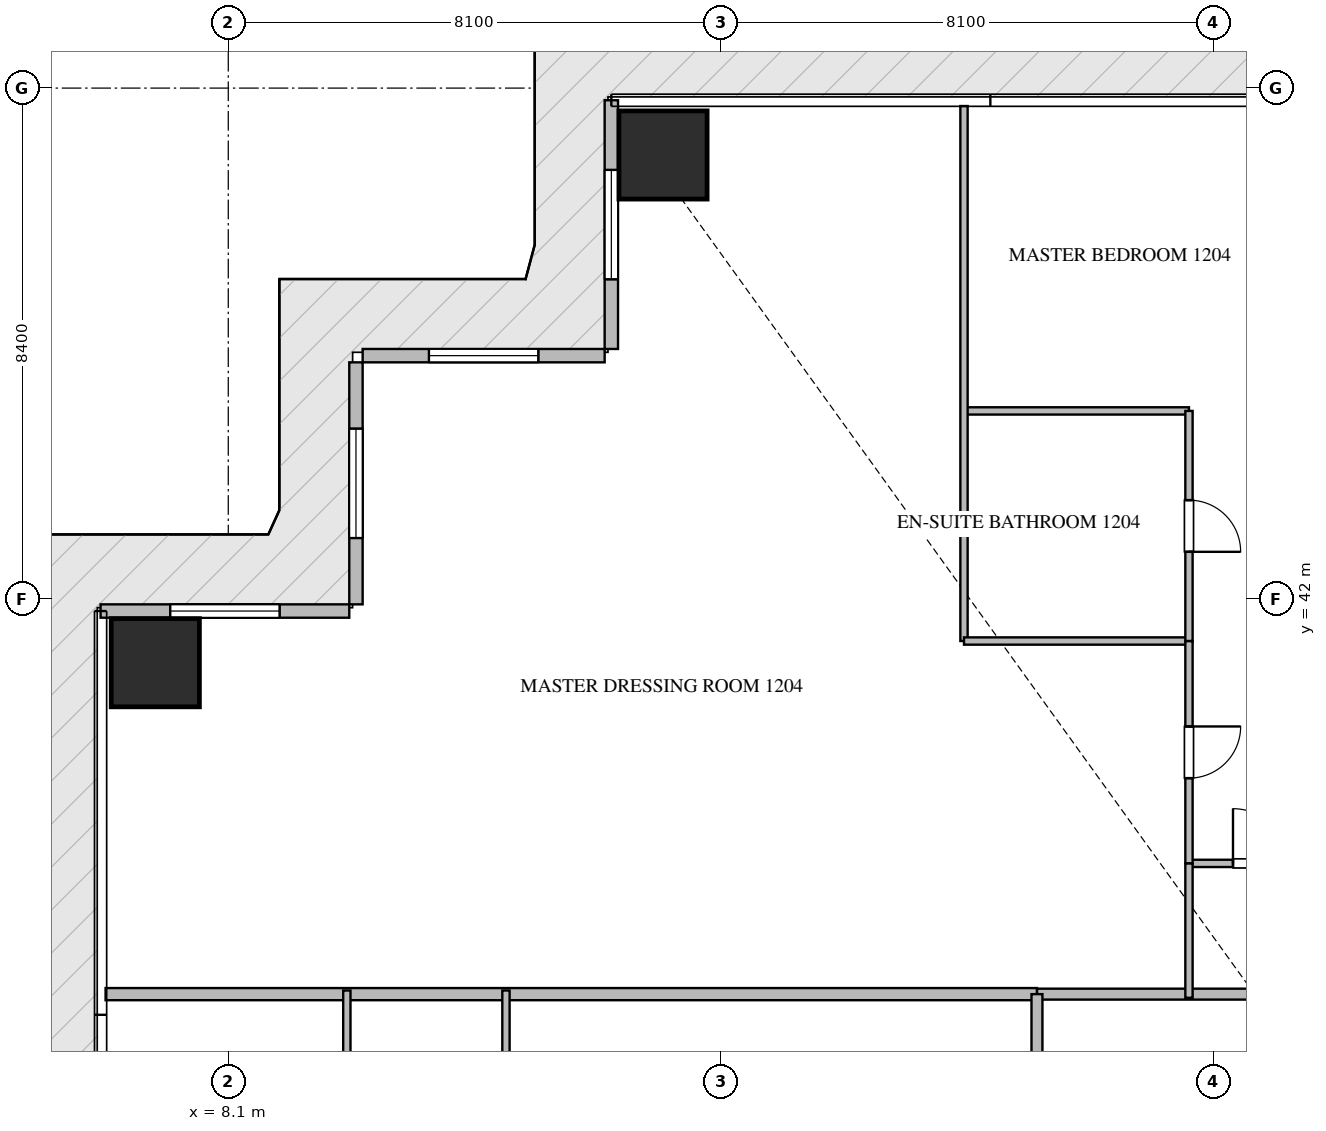
"""IFC4 building model, lengths in metres.
Left out: names, types, materials, properties, quantities, classifications, styles, units other than length and angle.
Written with IfcOpenShell. Run it as: python <this file> out.ifc"""

import sys

from ifc_helpers import new_model, si_unit, direction, frame, frame_2d, origin, origin_2d, place, context, subcontext, project, spatial, rectangle, extrude, source, transform, mapped, element, fill, save


model = new_model("IFC4")
c1 = context("Model", 3, precision=1e-05, world=origin(), true_north=direction((0.0, 1.0)))
c2 = subcontext(c1, "Body", "Model", "MODEL_VIEW")
j1 = project(units=[si_unit("LENGTHUNIT", "METRE"), si_unit("PLANEANGLEUNIT", "RADIAN")], contexts=[c1])
p1 = place(None, origin())
s1 = spatial("IfcSite", under=j1, at=p1, CompositionType="ELEMENT")
p2 = place(p1, origin())
s2 = spatial("IfcBuilding", under=s1, at=p2, CompositionType="ELEMENT")
p3 = place(p2, frame((0.0, 0.0, 52.95)))
s3 = spatial("IfcBuildingStorey", under=s2, at=p3, CompositionType="ELEMENT", Elevation=52.95)
m1 = source(origin(), c2, "Body", "SweptSolid", [
    extrude(rectangle(XDim=1.45, YDim=1.45, at=origin_2d()), origin(), (0.0, 0.0, 1.0), 3.75),
])
for number, where, z_axis, x_axis in (
    (1, (15.25, 49.3, -0.26), (0.0, 0.0, 1.0), (1.0, 0.0, 0.0)),
    (2, (6.9, 40.95, -0.26), (0.0, 0.0, 1.0), (1.0, 0.0, 0.0)),
):
    element("IfcColumn", number, at=place(p3, frame(where, z_axis=z_axis, x_axis=x_axis)), inside=s3, PredefinedType="COLUMN", context=c2, shape_type="MappedRepresentation", body=[
        mapped(m1, transform((0.0, 0.0, 0.0), scale=1.0)),
    ])
p4 = place(p3, frame((14.4, 50.2, 0.0), z_axis=(0.0, 0.0, 1.0), x_axis=(0.0, -1.0, 0.0)))
e3 = element("IfcWall", 3, at=p4, inside=s3, PredefinedType="ELEMENTEDWALL", context=c2, shape_type="SweptSolid", body=[
    extrude(rectangle(XDim=4.09, YDim=0.22, at=frame_2d((2.045, 0.0))), origin(), (0.0, 0.0, 1.0), 3.475),
])
p5 = place(p4, frame((1.145, 0.0, 0.65)))
e4 = element("IfcOpeningElement", 4, at=p5, cuts=e3, PredefinedType="OPENING", context=c2, shape_type="SweptSolid", body=[
    extrude(rectangle(XDim=1.8, YDim=2.1, at=frame_2d((0.9, 1.05))), frame((0.0, 0.12, 0.0), z_axis=(0.0, -1.0, 0.0), x_axis=(1.0, 0.0, 0.0)), (0.0, 0.0, 1.0), 0.24),
])
p6 = place(p3, frame((14.29, 46.0, 0.0), z_axis=(0.0, 0.0, 1.0), x_axis=(-1.0, 0.0, 0.0)))
e5 = element("IfcWall", 5, at=p6, inside=s3, PredefinedType="ELEMENTEDWALL", context=c2, shape_type="SweptSolid", body=[
    extrude(rectangle(XDim=3.98, YDim=0.22, at=frame_2d((1.99, 0.0))), origin(), (0.0, 0.0, 1.0), 3.475),
])
p7 = place(p6, frame((1.09, 0.0, 0.65)))
e6 = element("IfcOpeningElement", 6, at=p7, cuts=e5, PredefinedType="OPENING", context=c2, shape_type="SweptSolid", body=[
    extrude(rectangle(XDim=1.8, YDim=2.1, at=frame_2d((0.9, 1.05))), frame((0.0, 0.12, 0.0), z_axis=(0.0, -1.0, 0.0), x_axis=(1.0, 0.0, 0.0)), (0.0, 0.0, 1.0), 0.24),
])
p8 = place(p3, frame((10.2, 45.89, 0.0), z_axis=(0.0, 0.0, 1.0), x_axis=(0.0, -1.0, 0.0)))
e7 = element("IfcWall", 7, at=p8, inside=s3, PredefinedType="ELEMENTEDWALL", context=c2, shape_type="SweptSolid", body=[
    extrude(rectangle(XDim=3.98, YDim=0.22, at=frame_2d((1.99, 0.0))), origin(), (0.0, 0.0, 1.0), 3.475),
])
p9 = place(p8, frame((1.09, 0.0, 0.65)))
e8 = element("IfcOpeningElement", 8, at=p9, cuts=e7, PredefinedType="OPENING", context=c2, shape_type="SweptSolid", body=[
    extrude(rectangle(XDim=1.8, YDim=2.1, at=frame_2d((0.9, 1.05))), frame((0.0, 0.12, 0.0), z_axis=(0.0, -1.0, 0.0), x_axis=(1.0, 0.0, 0.0)), (0.0, 0.0, 1.0), 0.24),
])
p10 = place(p3, frame((10.09, 41.8, 0.0), z_axis=(0.0, 0.0, 1.0), x_axis=(-1.0, 0.0, 0.0)))
e9 = element("IfcWall", 9, at=p10, inside=s3, PredefinedType="ELEMENTEDWALL", context=c2, shape_type="SweptSolid", body=[
    extrude(rectangle(XDim=4.09, YDim=0.22, at=frame_2d((2.045, 0.0))), origin(), (0.0, 0.0, 1.0), 3.475),
])
p11 = place(p10, frame((1.145, 0.0, 0.65)))
e10 = element("IfcOpeningElement", 10, at=p11, cuts=e9, PredefinedType="OPENING", context=c2, shape_type="SweptSolid", body=[
    extrude(rectangle(XDim=1.8, YDim=2.1, at=frame_2d((0.9, 1.05))), frame((0.0, 0.12, 0.0), z_axis=(0.0, -1.0, 0.0), x_axis=(1.0, 0.0, 0.0)), (0.0, 0.0, 1.0), 0.24),
])
p12 = place(p3, frame((6.082, 35.5, 0.0), z_axis=(0.0, 0.0, 1.0), x_axis=(1.0, 0.0, 0.0)))
e11 = element("IfcWall", 11, at=p12, inside=s3, PredefinedType="PARTITIONING", context=c2, shape_type="SweptSolid", body=[
    extrude(rectangle(XDim=15.318, YDim=0.2, at=frame_2d((7.659, 0.0))), origin(), (0.0, 0.0, 1.0), 3.49),
])
p13 = place(p3, frame((21.402, 35.5, 0.0), z_axis=(0.0, 0.0, 1.0), x_axis=(1.0, 0.0, 0.0)))
e12 = element("IfcWall", 12, at=p13, inside=s3, PredefinedType="PARTITIONING", context=c2, shape_type="SweptSolid", body=[
    extrude(rectangle(XDim=21.996, YDim=0.18, at=frame_2d((10.998, 0.0))), origin(), (0.0, 0.0, 1.0), 3.49),
])
p14 = place(p13, frame((15.222, 0.0, 0.0)))
e13 = element("IfcOpeningElement", 13, at=p14, cuts=e12, PredefinedType="OPENING", context=c2, shape_type="SweptSolid", body=[
    extrude(rectangle(XDim=1.0, YDim=2.15, at=frame_2d((0.5, 1.075))), frame((0.0, 0.1, 0.0), z_axis=(0.0, -1.0, 0.0), x_axis=(1.0, 0.0, 0.0)), (0.0, 0.0, 1.0), 0.2),
])
p15 = place(p3, frame((21.4, 14.9, 0.0), z_axis=(0.0, 0.0, 1.0), x_axis=(0.0, 1.0, 0.0)))
e14 = element("IfcWall", 14, at=p15, inside=s3, PredefinedType="PARTITIONING", context=c2, shape_type="SweptSolid", body=[
    extrude(rectangle(XDim=20.6, YDim=0.18, at=frame_2d((10.3, 0.0))), origin(), (0.0, 0.0, 1.0), 3.49),
])
p16 = place(p15, frame((1.96, 0.0, 0.0)))
e15 = element("IfcOpeningElement", 15, at=p16, cuts=e14, PredefinedType="OPENING", context=c2, shape_type="SweptSolid", body=[
    extrude(rectangle(XDim=1.0, YDim=2.15, at=frame_2d((0.5, 1.075))), frame((0.0, 0.1, 0.0), z_axis=(0.0, -1.0, 0.0), x_axis=(1.0, 0.0, 0.0)), (0.0, 0.0, 1.0), 0.2),
])
p17 = place(p3, frame((23.9, 37.65, 0.0), z_axis=(0.0, 0.0, 1.0), x_axis=(1.0, 0.0, 0.0)))
e16 = element("IfcWall", 16, at=p17, inside=s3, PredefinedType="PARTITIONING", context=c2, shape_type="SweptSolid", body=[
    extrude(rectangle(XDim=2.348, YDim=0.12, at=frame_2d((1.174, 0.0))), origin(), (0.0, 0.0, 1.0), 3.49),
])
p18 = place(p17, frame((0.724, 0.0, 0.0)))
e17 = element("IfcOpeningElement", 17, at=p18, cuts=e16, PredefinedType="OPENING", context=c2, shape_type="SweptSolid", body=[
    extrude(rectangle(XDim=0.9, YDim=2.1, at=frame_2d((0.45, 1.05))), frame((0.0, 0.07, 0.0), z_axis=(0.0, -1.0, 0.0), x_axis=(1.0, 0.0, 0.0)), (0.0, 0.0, 1.0), 0.14),
])
p19 = place(p3, frame((20.2, 45.091, 0.0), z_axis=(0.0, 0.0, 1.0), x_axis=(1.0, 0.0, 0.0)))
e18 = element("IfcWall", 18, at=p19, inside=s3, PredefinedType="PARTITIONING", context=c2, shape_type="SweptSolid", body=[
    extrude(rectangle(XDim=3.7, YDim=0.12, at=frame_2d((1.85, 0.0))), origin(), (0.0, 0.0, 1.0), 3.49),
])
p20 = place(p3, frame((20.2, 50.105, 0.0), z_axis=(0.0, 0.0, 1.0), x_axis=(0.0, -1.0, 0.0)))
e19 = element("IfcWall", 19, at=p20, inside=s3, PredefinedType="PARTITIONING", context=c2, shape_type="SweptSolid", body=[
    extrude(rectangle(XDim=8.798, YDim=0.12, at=frame_2d((4.399, 0.0))), origin(), (0.0, 0.0, 1.0), 3.49),
])
p21 = place(p3, frame((20.2, 41.307, 0.0), z_axis=(0.0, 0.0, 1.0), x_axis=(1.0, 0.0, 0.0)))
e20 = element("IfcWall", 20, at=p21, inside=s3, PredefinedType="PARTITIONING", context=c2, shape_type="SweptSolid", body=[
    extrude(rectangle(XDim=3.7, YDim=0.12, at=frame_2d((1.85, 0.0))), origin(), (0.0, 0.0, 1.0), 3.49),
])
p22 = place(p3, frame((23.9, 45.091, 0.0), z_axis=(0.0, 0.0, 1.0), x_axis=(0.0, -1.0, 0.0)))
e21 = element("IfcWall", 21, at=p22, inside=s3, PredefinedType="PARTITIONING", context=c2, shape_type="SweptSolid", body=[
    extrude(rectangle(XDim=3.784, YDim=0.12, at=frame_2d((1.892, 0.0))), origin(), (0.0, 0.0, 1.0), 3.49),
])
p23 = place(p22, frame((1.467, 0.0, 0.0)))
e22 = element("IfcOpeningElement", 22, at=p23, cuts=e21, PredefinedType="OPENING", context=c2, shape_type="SweptSolid", body=[
    extrude(rectangle(XDim=0.85, YDim=2.1, at=frame_2d((0.425, 1.05))), frame((0.0, 0.07, 0.0), z_axis=(0.0, -1.0, 0.0), x_axis=(1.0, 0.0, 0.0)), (0.0, 0.0, 1.0), 0.14),
])
p24 = place(p3, frame((23.9, 41.305, 0.0), z_axis=(0.0, 0.0, 1.0), x_axis=(0.0, -1.0, 0.0)))
e23 = element("IfcWall", 23, at=p24, inside=s3, PredefinedType="PARTITIONING", context=c2, shape_type="SweptSolid", body=[
    extrude(rectangle(XDim=3.655, YDim=0.12, at=frame_2d((1.828, 0.0))), origin(), (0.0, 0.0, 1.0), 3.49),
])
p25 = place(p24, frame((1.403, 0.0, 0.0)))
e24 = element("IfcOpeningElement", 24, at=p25, cuts=e23, PredefinedType="OPENING", context=c2, shape_type="SweptSolid", body=[
    extrude(rectangle(XDim=0.85, YDim=2.1, at=frame_2d((0.425, 1.05))), frame((0.0, 0.07, 0.0), z_axis=(0.0, -1.0, 0.0), x_axis=(1.0, 0.0, 0.0)), (0.0, 0.0, 1.0), 0.14),
])
p26 = place(p3, frame((23.9, 37.648, 0.0), z_axis=(0.0, 0.0, 1.0), x_axis=(0.0, -1.0, 0.0)))
e25 = element("IfcWall", 25, at=p26, inside=s3, PredefinedType="PARTITIONING", context=c2, shape_type="SweptSolid", body=[
    extrude(rectangle(XDim=2.208, YDim=0.12, at=frame_2d((1.104, 0.0))), origin(), (0.0, 0.0, 1.0), 3.49),
])
for number, where, z_axis, x_axis in (
    (26, (10.05, 30.15, 0.0), (0.0, 0.0, 1.0), (0.0, 1.0, 0.0)),
    (27, (12.667, 30.15, 0.0), (0.0, 0.0, 1.0), (0.0, 1.0, 0.0)),
):
    element("IfcWall", number, at=place(p3, frame(where, z_axis=z_axis, x_axis=x_axis)), inside=s3, PredefinedType="PARTITIONING", context=c2, shape_type="SweptSolid", body=[
        extrude(rectangle(XDim=5.41, YDim=0.12, at=frame_2d((2.705, 0.0))), origin(), (0.0, 0.0, 1.0), 3.49),
    ])
m2 = source(origin(), c2, "Body", "SweptSolid", [
    extrude(rectangle(XDim=1.8, YDim=2.1, at=frame_2d((0.9, 1.05))), frame((0.0, 0.03, 0.0), z_axis=(0.0, -1.0, 0.0), x_axis=(1.0, 0.0, 0.0)), (0.0, 0.0, 1.0), 0.06),
])
p27 = place(p5, origin())
e28 = element("IfcWindow", 28, at=p27, inside=s3, PartitioningType="SINGLE_PANEL", PredefinedType="WINDOW", context=c2, shape_type="MappedRepresentation", body=[
    mapped(m2, transform((0.0, 0.0, 0.0), scale=1.0)),
])
fill(e4, e28)
p28 = place(p7, origin())
e29 = element("IfcWindow", 29, at=p28, inside=s3, PartitioningType="SINGLE_PANEL", PredefinedType="WINDOW", context=c2, shape_type="MappedRepresentation", body=[
    mapped(m2, transform((0.0, 0.0, 0.0), scale=1.0)),
])
fill(e6, e29)
p29 = place(p9, origin())
e30 = element("IfcWindow", 30, at=p29, inside=s3, PartitioningType="SINGLE_PANEL", PredefinedType="WINDOW", context=c2, shape_type="MappedRepresentation", body=[
    mapped(m2, transform((0.0, 0.0, 0.0), scale=1.0)),
])
fill(e8, e30)
p30 = place(p11, origin())
e31 = element("IfcWindow", 31, at=p30, inside=s3, PartitioningType="SINGLE_PANEL", PredefinedType="WINDOW", context=c2, shape_type="MappedRepresentation", body=[
    mapped(m2, transform((0.0, 0.0, 0.0), scale=1.0)),
])
fill(e10, e31)
m3 = source(origin(), c2, "Body", "SweptSolid", [
    extrude(rectangle(XDim=0.9, YDim=2.1, at=frame_2d((0.45, 1.05))), frame((0.0, 0.025, 0.0), z_axis=(0.0, -1.0, 0.0), x_axis=(1.0, 0.0, 0.0)), (0.0, 0.0, 1.0), 0.05),
])
p31 = place(p18, origin())
e32 = element("IfcDoor", 32, at=p31, inside=s3, OperationType="SINGLE_SWING_LEFT", PredefinedType="DOOR", context=c2, shape_type="MappedRepresentation", body=[
    mapped(m3, transform((0.0, 0.0, 0.0), scale=1.0)),
])
fill(e17, e32)
m4 = source(origin(), c2, "Body", "SweptSolid", [
    extrude(rectangle(XDim=0.85, YDim=2.1, at=frame_2d((0.425, 1.05))), frame((0.0, 0.025, 0.0), z_axis=(0.0, -1.0, 0.0), x_axis=(1.0, 0.0, 0.0)), (0.0, 0.0, 1.0), 0.05),
])
p32 = place(p23, origin())
e33 = element("IfcDoor", 33, at=p32, inside=s3, OperationType="SINGLE_SWING_RIGHT", PredefinedType="DOOR", context=c2, shape_type="MappedRepresentation", body=[
    mapped(m4, transform((0.0, 0.0, 0.0), scale=1.0)),
])
fill(e22, e33)
p33 = place(p25, origin())
e34 = element("IfcDoor", 34, at=p33, inside=s3, OperationType="SINGLE_SWING_LEFT", PredefinedType="DOOR", context=c2, shape_type="MappedRepresentation", body=[
    mapped(m4, transform((0.0, 0.0, 0.0), scale=1.0)),
])
fill(e24, e34)
save(model, sys.argv[1])
